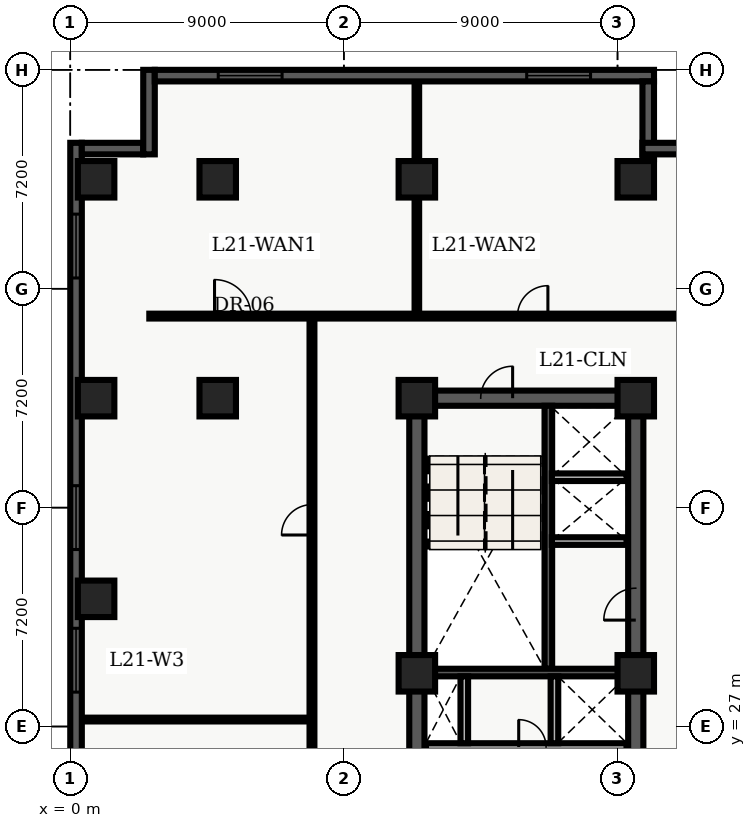
"""IFC4 building model, lengths in metres.
Left out: names, types, materials, properties, quantities, classifications, styles, units other than length and angle.
Written with IfcOpenShell. Run it as: python <this file> out.ifc"""

import sys

from ifc_helpers import new_model, entity, si_unit, converted_unit, direction, frame, origin_with_axes, origin_2d_with_axis, place, context, subcontext, project, spatial, polyline, rectangle, outline, extrude, element, fill, save


model = new_model("IFC4")
c1 = context("Model", 3, precision=1e-05, world=origin_with_axes(), true_north=direction((0.0, 1.0)))
c2 = subcontext(c1, "Body", "Model", "MODEL_VIEW")
j1 = project(units=[si_unit("LENGTHUNIT", "METRE"), converted_unit("PLANEANGLEUNIT", "DEGREE", entity("IfcPlaneAngleMeasure", 0.017), si_unit("PLANEANGLEUNIT", "RADIAN"), dimensions=[0, 0, 0, 0, 0, 0, 0])], contexts=[c1])
p1 = place(None, origin_with_axes())
s1 = spatial("IfcSite", under=j1, at=p1, CompositionType="ELEMENT")
p2 = place(p1, origin_with_axes())
s2 = spatial("IfcBuilding", under=s1, at=p2, CompositionType="ELEMENT")
p3 = place(p2, frame((0.0, 0.0, 89.1), z_axis=(0.0, 0.0, 1.0), x_axis=(1.0, 0.0, 0.0)))
s3 = spatial("IfcBuildingStorey", under=s2, at=p3, CompositionType="ELEMENT", Elevation=89.1)
p4 = place(p3, frame((11.4, 10.8, 0.0), z_axis=(0.0, 0.0, 1.0), x_axis=(0.0, 1.0, 0.0)))
e1 = element("IfcWall", 1, at=p4, inside=s3, PredefinedType="SHEAR", context=c2, shape_type="SweptSolid", body=[
    extrude(outline(polyline([(0.0, -0.25), (27.0, -0.25), (27.0, 0.25), (0.0, 0.25), (0.0, -0.25)])), origin_with_axes(), (0.0, 0.0, 1.0), 3.66),
])
p5 = place(p3, frame((11.4, 37.8, 0.0), z_axis=(0.0, 0.0, 1.0), x_axis=(1.0, 0.0, 0.0)))
e2 = element("IfcWall", 2, at=p5, inside=s3, PredefinedType="SHEAR", context=c2, shape_type="SweptSolid", body=[
    extrude(outline(polyline([(0.0, -0.25), (7.2, -0.25), (7.2, 0.25), (0.0, 0.25), (0.0, -0.25)])), origin_with_axes(), (0.0, 0.0, 1.0), 3.66),
])
p6 = place(p5, frame((2.625, 0.0, 0.0), z_axis=(0.0, 0.0, 1.0), x_axis=(1.0, 0.0, 0.0)))
e3 = element("IfcOpeningElement", 3, at=p6, cuts=e2, PredefinedType="OPENING", context=c2, shape_type="SweptSolid", body=[
    extrude(rectangle(XDim=1.05, YDim=0.52, at=origin_2d_with_axis()), origin_with_axes(), (0.0, 0.0, 1.0), 2.15),
])
p7 = place(p3, frame((18.6, 24.3, 0.0), z_axis=(0.0, 0.0, 1.0), x_axis=(0.0, 1.0, 0.0)))
e4 = element("IfcWall", 4, at=p7, inside=s3, PredefinedType="SHEAR", context=c2, shape_type="SweptSolid", body=[
    extrude(outline(polyline([(0.0, -0.25), (13.5, -0.25), (13.5, 0.25), (0.0, 0.25), (0.0, -0.25)])), origin_with_axes(), (0.0, 0.0, 1.0), 3.66),
])
p8 = place(p7, frame((6.725, 0.0, 0.0), z_axis=(0.0, 0.0, 1.0), x_axis=(1.0, 0.0, 0.0)))
e5 = element("IfcOpeningElement", 5, at=p8, cuts=e4, PredefinedType="OPENING", context=c2, shape_type="SweptSolid", body=[
    extrude(rectangle(XDim=1.05, YDim=0.52, at=origin_2d_with_axis()), origin_with_axes(), (0.0, 0.0, 1.0), 2.15),
])
p9 = place(p3, frame((15.725, 28.9, 0.0), z_axis=(0.0, 0.0, 1.0), x_axis=(0.0, 1.0, 0.0)))
e6 = element("IfcWall", 6, at=p9, inside=s3, PredefinedType="SHEAR", context=c2, shape_type="SweptSolid", body=[
    extrude(outline(polyline([(0.0, -0.125), (8.65, -0.125), (8.65, 0.125), (0.0, 0.125), (0.0, -0.125)])), origin_with_axes(), (0.0, 0.0, 1.0), 3.66),
])
p10 = place(p3, frame((11.65, 28.775, 0.0), z_axis=(0.0, 0.0, 1.0), x_axis=(1.0, 0.0, 0.0)))
e7 = element("IfcWall", 7, at=p10, inside=s3, PredefinedType="SHEAR", context=c2, shape_type="SweptSolid", body=[
    extrude(outline(polyline([(0.0, -0.125), (6.7, -0.125), (6.7, 0.125), (0.0, 0.125), (0.0, -0.125)])), origin_with_axes(), (0.0, 0.0, 1.0), 3.66),
])
p11 = place(p3, frame((11.7, 26.325, 0.0), z_axis=(0.0, 0.0, 1.0), x_axis=(1.0, 0.0, 0.0)))
e8 = element("IfcWall", 8, at=p11, inside=s3, PredefinedType="SOLIDWALL", context=c2, shape_type="SweptSolid", body=[
    extrude(outline(polyline([(0.0, -0.125), (6.6, -0.125), (6.6, 0.125), (0.0, 0.125), (0.0, -0.125)])), origin_with_axes(), (0.0, 0.0, 1.0), 2.7),
])
p12 = place(p11, frame((3.5, 0.0, 0.0), z_axis=(0.0, 0.0, 1.0), x_axis=(1.0, 0.0, 0.0)))
e9 = element("IfcOpeningElement", 9, at=p12, cuts=e8, PredefinedType="OPENING", context=c2, shape_type="SweptSolid", body=[
    extrude(rectangle(XDim=0.9, YDim=0.27, at=origin_2d_with_axis()), origin_with_axes(), (0.0, 0.0, 1.0), 2.15),
])
for number, where, z_axis, x_axis in (
    (10, (12.96, 26.45, 0.0), (0.0, 0.0, 1.0), (0.0, 1.0, 0.0)),
    (11, (15.925, 26.45, 0.0), (0.0, 0.0, 1.0), (0.0, 1.0, 0.0)),
):
    element("IfcWall", number, at=place(p3, frame(where, z_axis=z_axis, x_axis=x_axis)), inside=s3, PredefinedType="SOLIDWALL", context=c2, shape_type="SweptSolid", body=[
        extrude(outline(polyline([(0.0, -0.125), (2.2, -0.125), (2.2, 0.125), (0.0, 0.125), (0.0, -0.125)])), origin_with_axes(), (0.0, 0.0, 1.0), 2.7),
    ])
for number, where, z_axis, x_axis in (
    (12, (11.4, 28.75, 0.0), (0.0, 0.0, 1.0), (1.0, 0.0, 0.0)),
    (13, (11.4, 37.8, 0.0), (0.0, 0.0, 1.0), (1.0, 0.0, 0.0)),
    (14, (11.4, 45.0, 0.0), (0.0, 0.0, 1.0), (1.0, 0.0, 0.0)),
    (15, (18.6, 28.75, 0.0), (0.0, 0.0, 1.0), (1.0, 0.0, 0.0)),
    (16, (18.6, 37.8, 0.0), (0.0, 0.0, 1.0), (1.0, 0.0, 0.0)),
    (17, (18.6, 45.0, 0.0), (0.0, 0.0, 1.0), (1.0, 0.0, 0.0)),
    (18, (4.85, 37.8, 0.0), (0.0, 0.0, 1.0), (1.0, 0.0, 0.0)),
    (19, (4.85, 45.0, 0.0), (0.0, 0.0, 1.0), (1.0, 0.0, 0.0)),
    (20, (0.85, 31.2, 0.0), (0.0, 0.0, 1.0), (1.0, 0.0, 0.0)),
    (21, (0.85, 37.8, 0.0), (0.0, 0.0, 1.0), (1.0, 0.0, 0.0)),
    (22, (0.85, 45.0, 0.0), (0.0, 0.0, 1.0), (1.0, 0.0, 0.0)),
):
    element("IfcColumn", number, at=place(p3, frame(where, z_axis=z_axis, x_axis=x_axis)), inside=s3, PredefinedType="COLUMN", context=c2, shape_type="SweptSolid", body=[
        extrude(rectangle(XDim=1.2, YDim=1.2, at=origin_2d_with_axis()), origin_with_axes(), (0.0, 0.0, 1.0), 3.9),
    ])
for number, where, z_axis, x_axis in (
    (23, (15.84, 33.1, 0.0), (0.0, 0.0, 1.0), (1.0, 0.0, 0.0)),
    (24, (15.84, 35.2, 0.0), (0.0, 0.0, 1.0), (1.0, 0.0, 0.0)),
):
    element("IfcWall", number, at=place(p3, frame(where, z_axis=z_axis, x_axis=x_axis)), inside=s3, PredefinedType="SOLIDWALL", context=c2, shape_type="SweptSolid", body=[
        extrude(outline(polyline([(0.0, -0.125), (2.46, -0.125), (2.46, 0.125), (0.0, 0.125), (0.0, -0.125)])), origin_with_axes(), (0.0, 0.0, 1.0), 2.7),
    ])
p13 = place(p3, frame((2.6, 40.5, 0.0), z_axis=(0.0, 0.0, 1.0), x_axis=(1.0, 0.0, 0.0)))
e25 = element("IfcWall", 25, at=p13, inside=s3, PredefinedType="PARTITIONING", context=c2, shape_type="SweptSolid", body=[
    extrude(outline(polyline([(0.0, -0.08), (18.65, -0.08), (18.65, 0.08), (0.0, 0.08), (0.0, -0.08)])), origin_with_axes(), (0.0, 0.0, 1.0), 2.7),
])
p14 = place(p13, frame((2.745, 0.0, 0.0), z_axis=(0.0, 0.0, 1.0), x_axis=(1.0, 0.0, 0.0)))
e26 = element("IfcOpeningElement", 26, at=p14, cuts=e25, PredefinedType="OPENING", context=c2, shape_type="SweptSolid", body=[
    extrude(rectangle(XDim=1.2, YDim=0.18, at=origin_2d_with_axis()), origin_with_axes(), (0.0, 0.0, 1.0), 2.2),
])
p15 = place(p13, frame((12.61, 0.0, 0.0), z_axis=(0.0, 0.0, 1.0), x_axis=(1.0, 0.0, 0.0)))
e27 = element("IfcOpeningElement", 27, at=p15, cuts=e25, PredefinedType="OPENING", context=c2, shape_type="SweptSolid", body=[
    extrude(rectangle(XDim=1.0, YDim=0.18, at=origin_2d_with_axis()), origin_with_axes(), (0.0, 0.0, 1.0), 2.15),
])
p16 = place(p3, frame((7.95, 7.8, 0.0), z_axis=(0.0, 0.0, 1.0), x_axis=(0.0, 1.0, 0.0)))
e28 = element("IfcWall", 28, at=p16, inside=s3, PredefinedType="PARTITIONING", context=c2, shape_type="SweptSolid", body=[
    extrude(outline(polyline([(0.0, -0.08), (32.7, -0.08), (32.7, 0.08), (0.0, 0.08), (0.0, -0.08)])), origin_with_axes(), (0.0, 0.0, 1.0), 2.7),
])
p17 = place(p16, frame((4.411, 0.0, 0.0), z_axis=(0.0, 0.0, 1.0), x_axis=(1.0, 0.0, 0.0)))
e29 = element("IfcOpeningElement", 29, at=p17, cuts=e28, PredefinedType="OPENING", context=c2, shape_type="SweptSolid", body=[
    extrude(rectangle(XDim=1.0, YDim=0.18, at=origin_2d_with_axis()), origin_with_axes(), (0.0, 0.0, 1.0), 2.15),
])
p18 = place(p16, frame((14.06, 0.0, 0.0), z_axis=(0.0, 0.0, 1.0), x_axis=(1.0, 0.0, 0.0)))
e30 = element("IfcOpeningElement", 30, at=p18, cuts=e28, PredefinedType="OPENING", context=c2, shape_type="SweptSolid", body=[
    extrude(rectangle(XDim=1.0, YDim=0.18, at=origin_2d_with_axis()), origin_with_axes(), (0.0, 0.0, 1.0), 2.15),
])
p19 = place(p16, frame((26.0, 0.0, 0.0), z_axis=(0.0, 0.0, 1.0), x_axis=(1.0, 0.0, 0.0)))
e31 = element("IfcOpeningElement", 31, at=p19, cuts=e28, PredefinedType="OPENING", context=c2, shape_type="SweptSolid", body=[
    extrude(rectangle(XDim=1.0, YDim=0.18, at=origin_2d_with_axis()), origin_with_axes(), (0.0, 0.0, 1.0), 2.15),
])
p20 = place(p3, frame((0.375, 27.229, 0.0), z_axis=(0.0, 0.0, 1.0), x_axis=(1.0, 0.0, 0.0)))
e32 = element("IfcWall", 32, at=p20, inside=s3, PredefinedType="PARTITIONING", context=c2, shape_type="SweptSolid", body=[
    extrude(outline(polyline([(0.0, -0.062), (7.455, -0.062), (7.455, 0.062), (0.0, 0.062), (0.0, -0.062)])), origin_with_axes(), (0.0, 0.0, 1.0), 2.7),
])
p21 = place(p3, frame((11.4, 40.6, 0.0), z_axis=(0.0, 0.0, 1.0), x_axis=(0.0, 1.0, 0.0)))
e33 = element("IfcWall", 33, at=p21, inside=s3, PredefinedType="PARTITIONING", context=c2, shape_type="SweptSolid", body=[
    extrude(outline(polyline([(0.0, -0.075), (7.64, -0.075), (7.64, 0.075), (0.0, 0.075), (0.0, -0.075)])), origin_with_axes(), (0.0, 0.0, 1.0), 2.7),
])
p22 = place(p3, frame((0.19, 2.78, 0.0), z_axis=(0.0, 0.0, 1.0), x_axis=(0.0, 1.0, 0.0)))
e34 = element("IfcWall", 34, at=p22, inside=s3, PredefinedType="SOLIDWALL", context=c2, shape_type="SweptSolid", body=[
    extrude(outline(polyline([(0.0, -0.19), (43.42, -0.19), (43.42, 0.19), (0.0, 0.19), (0.0, -0.19)])), origin_with_axes(), (0.0, 0.0, 1.0), 3.66),
])
p23 = place(p22, frame((2.946, 0.0, 0.45), z_axis=(0.0, 0.0, 1.0), x_axis=(1.0, 0.0, 0.0)))
e35 = element("IfcOpeningElement", 35, at=p23, cuts=e34, PredefinedType="OPENING", context=c2, shape_type="SweptSolid", body=[
    extrude(rectangle(XDim=2.1, YDim=0.4, at=origin_2d_with_axis()), origin_with_axes(), (0.0, 0.0, 1.0), 2.2),
])
p24 = place(p22, frame((11.878, 0.0, 0.45), z_axis=(0.0, 0.0, 1.0), x_axis=(1.0, 0.0, 0.0)))
e36 = element("IfcOpeningElement", 36, at=p24, cuts=e34, PredefinedType="OPENING", context=c2, shape_type="SweptSolid", body=[
    extrude(rectangle(XDim=2.1, YDim=0.4, at=origin_2d_with_axis()), origin_with_axes(), (0.0, 0.0, 1.0), 2.2),
])
p25 = place(p22, frame((17.469, 0.0, 0.45), z_axis=(0.0, 0.0, 1.0), x_axis=(1.0, 0.0, 0.0)))
e37 = element("IfcOpeningElement", 37, at=p25, cuts=e34, PredefinedType="OPENING", context=c2, shape_type="SweptSolid", body=[
    extrude(rectangle(XDim=2.1, YDim=0.4, at=origin_2d_with_axis()), origin_with_axes(), (0.0, 0.0, 1.0), 2.2),
])
p26 = place(p22, frame((21.71, 0.0, 0.45), z_axis=(0.0, 0.0, 1.0), x_axis=(1.0, 0.0, 0.0)))
e38 = element("IfcOpeningElement", 38, at=p26, cuts=e34, PredefinedType="OPENING", context=c2, shape_type="SweptSolid", body=[
    extrude(rectangle(XDim=2.1, YDim=0.4, at=origin_2d_with_axis()), origin_with_axes(), (0.0, 0.0, 1.0), 2.2),
])
p27 = place(p22, frame((26.401, 0.0, 0.45), z_axis=(0.0, 0.0, 1.0), x_axis=(1.0, 0.0, 0.0)))
e39 = element("IfcOpeningElement", 39, at=p27, cuts=e34, PredefinedType="OPENING", context=c2, shape_type="SweptSolid", body=[
    extrude(rectangle(XDim=2.1, YDim=0.4, at=origin_2d_with_axis()), origin_with_axes(), (0.0, 0.0, 1.0), 2.2),
])
p28 = place(p22, frame((31.092, 0.0, 0.45), z_axis=(0.0, 0.0, 1.0), x_axis=(1.0, 0.0, 0.0)))
e40 = element("IfcOpeningElement", 40, at=p28, cuts=e34, PredefinedType="OPENING", context=c2, shape_type="SweptSolid", body=[
    extrude(rectangle(XDim=2.1, YDim=0.4, at=origin_2d_with_axis()), origin_with_axes(), (0.0, 0.0, 1.0), 2.2),
])
p29 = place(p22, frame((40.024, 0.0, 0.45), z_axis=(0.0, 0.0, 1.0), x_axis=(1.0, 0.0, 0.0)))
e41 = element("IfcOpeningElement", 41, at=p29, cuts=e34, PredefinedType="OPENING", context=c2, shape_type="SweptSolid", body=[
    extrude(rectangle(XDim=2.1, YDim=0.4, at=origin_2d_with_axis()), origin_with_axes(), (0.0, 0.0, 1.0), 2.2),
])
p30 = place(p3, frame((0.38, 46.01, 0.0), z_axis=(0.0, 0.0, 1.0), x_axis=(1.0, 0.0, 0.0)))
e42 = element("IfcWall", 42, at=p30, inside=s3, PredefinedType="SOLIDWALL", context=c2, shape_type="SweptSolid", body=[
    extrude(outline(polyline([(0.0, -0.19), (2.02, -0.19), (2.02, 0.19), (0.0, 0.19), (0.0, -0.19)])), origin_with_axes(), (0.0, 0.0, 1.0), 3.66),
])
p31 = place(p3, frame((2.59, 45.82, 0.0), z_axis=(0.0, 0.0, 1.0), x_axis=(0.0, 1.0, 0.0)))
e43 = element("IfcWall", 43, at=p31, inside=s3, PredefinedType="SOLIDWALL", context=c2, shape_type="SweptSolid", body=[
    extrude(outline(polyline([(0.0, -0.19), (2.78, -0.19), (2.78, 0.19), (0.0, 0.19), (0.0, -0.19)])), origin_with_axes(), (0.0, 0.0, 1.0), 3.66),
])
p32 = place(p3, frame((2.78, 48.41, 0.0), z_axis=(0.0, 0.0, 1.0), x_axis=(1.0, 0.0, 0.0)))
e44 = element("IfcWall", 44, at=p32, inside=s3, PredefinedType="SOLIDWALL", context=c2, shape_type="SweptSolid", body=[
    extrude(outline(polyline([(0.0, -0.19), (16.42, -0.19), (16.42, 0.19), (0.0, 0.19), (0.0, -0.19)])), origin_with_axes(), (0.0, 0.0, 1.0), 3.66),
])
p33 = place(p32, frame((3.137, 0.0, 0.45), z_axis=(0.0, 0.0, 1.0), x_axis=(1.0, 0.0, 0.0)))
e45 = element("IfcOpeningElement", 45, at=p33, cuts=e44, PredefinedType="OPENING", context=c2, shape_type="SweptSolid", body=[
    extrude(rectangle(XDim=2.1, YDim=0.4, at=origin_2d_with_axis()), origin_with_axes(), (0.0, 0.0, 1.0), 2.2),
])
p34 = place(p32, frame((13.283, 0.0, 0.45), z_axis=(0.0, 0.0, 1.0), x_axis=(1.0, 0.0, 0.0)))
e46 = element("IfcOpeningElement", 46, at=p34, cuts=e44, PredefinedType="OPENING", context=c2, shape_type="SweptSolid", body=[
    extrude(rectangle(XDim=2.1, YDim=0.4, at=origin_2d_with_axis()), origin_with_axes(), (0.0, 0.0, 1.0), 2.2),
])
p35 = place(p3, frame((19.01, 48.22, 0.0), z_axis=(0.0, 0.0, 1.0), x_axis=(0.0, -1.0, 0.0)))
e47 = element("IfcWall", 47, at=p35, inside=s3, PredefinedType="SOLIDWALL", context=c2, shape_type="SweptSolid", body=[
    extrude(outline(polyline([(0.0, -0.19), (2.56, -0.19), (2.56, 0.19), (0.0, 0.19), (0.0, -0.19)])), origin_with_axes(), (0.0, 0.0, 1.0), 3.66),
])
p36 = place(p3, frame((18.82, 46.01, 0.0), z_axis=(0.0, 0.0, 1.0), x_axis=(1.0, 0.0, 0.0)))
e48 = element("IfcWall", 48, at=p36, inside=s3, PredefinedType="SOLIDWALL", context=c2, shape_type="SweptSolid", body=[
    extrude(outline(polyline([(0.0, -0.19), (2.78, -0.19), (2.78, 0.19), (0.0, 0.19), (0.0, -0.19)])), origin_with_axes(), (0.0, 0.0, 1.0), 3.66),
])
p37 = place(p5, frame((2.625, 0.0, 0.0), z_axis=(0.0, 0.0, 1.0), x_axis=(1.0, 0.0, 0.0)))
e49 = element("IfcDoor", 49, at=p37, inside=s3, OperationType="SINGLE_SWING_RIGHT", PredefinedType="DOOR", context=c2, shape_type="SweptSolid", body=[
    extrude(rectangle(XDim=1.05, YDim=0.09, at=origin_2d_with_axis()), origin_with_axes(), (0.0, 0.0, 1.0), 2.15),
])
fill(e3, e49)
p38 = place(p11, frame((3.5, 0.0, 0.0), z_axis=(0.0, 0.0, 1.0), x_axis=(1.0, 0.0, 0.0)))
e50 = element("IfcDoor", 50, at=p38, inside=s3, OperationType="SINGLE_SWING_LEFT", PredefinedType="DOOR", context=c2, shape_type="SweptSolid", body=[
    extrude(rectangle(XDim=0.9, YDim=0.09, at=origin_2d_with_axis()), origin_with_axes(), (0.0, 0.0, 1.0), 2.15),
])
fill(e9, e50)
p39 = place(p7, frame((6.725, 0.0, 0.0), z_axis=(0.0, 0.0, 1.0), x_axis=(1.0, 0.0, 0.0)))
e51 = element("IfcDoor", 51, at=p39, inside=s3, OperationType="SINGLE_SWING_LEFT", PredefinedType="DOOR", context=c2, shape_type="SweptSolid", body=[
    extrude(rectangle(XDim=1.05, YDim=0.09, at=origin_2d_with_axis()), origin_with_axes(), (0.0, 0.0, 1.0), 2.15),
])
fill(e5, e51)
p40 = place(p16, frame((26.0, 0.0, 0.0), z_axis=(0.0, 0.0, 1.0), x_axis=(1.0, 0.0, 0.0)))
e52 = element("IfcDoor", 52, at=p40, inside=s3, OperationType="SINGLE_SWING_LEFT", PredefinedType="DOOR", context=c2, shape_type="SweptSolid", body=[
    extrude(rectangle(XDim=1.0, YDim=0.09, at=origin_2d_with_axis()), origin_with_axes(), (0.0, 0.0, 1.0), 2.15),
])
fill(e31, e52)
p41 = place(p13, frame((2.745, 0.0, 0.0), z_axis=(0.0, 0.0, 1.0), x_axis=(1.0, 0.0, 0.0)))
e53 = element("IfcDoor", 53, at=p41, inside=s3, OperationType="SINGLE_SWING_LEFT", PredefinedType="DOOR", context=c2, shape_type="SweptSolid", body=[
    extrude(rectangle(XDim=1.2, YDim=0.09, at=origin_2d_with_axis()), origin_with_axes(), (0.0, 0.0, 1.0), 2.2),
])
fill(e26, e53)
p42 = place(p13, frame((12.61, 0.0, 0.0), z_axis=(0.0, 0.0, 1.0), x_axis=(1.0, 0.0, 0.0)))
e54 = element("IfcDoor", 54, at=p42, inside=s3, OperationType="SINGLE_SWING_RIGHT", PredefinedType="DOOR", context=c2, shape_type="SweptSolid", body=[
    extrude(rectangle(XDim=1.0, YDim=0.09, at=origin_2d_with_axis()), origin_with_axes(), (0.0, 0.0, 1.0), 2.15),
])
fill(e27, e54)
p43 = place(p22, frame((26.401, 0.0, 0.45), z_axis=(0.0, 0.0, 1.0), x_axis=(1.0, 0.0, 0.0)))
e55 = element("IfcWindow", 55, at=p43, inside=s3, PredefinedType="WINDOW", context=c2, shape_type="SweptSolid", body=[
    extrude(rectangle(XDim=2.1, YDim=0.09, at=origin_2d_with_axis()), origin_with_axes(), (0.0, 0.0, 1.0), 2.2),
])
fill(e39, e55)
p44 = place(p22, frame((31.092, 0.0, 0.45), z_axis=(0.0, 0.0, 1.0), x_axis=(1.0, 0.0, 0.0)))
e56 = element("IfcWindow", 56, at=p44, inside=s3, PredefinedType="WINDOW", context=c2, shape_type="SweptSolid", body=[
    extrude(rectangle(XDim=2.1, YDim=0.09, at=origin_2d_with_axis()), origin_with_axes(), (0.0, 0.0, 1.0), 2.2),
])
fill(e40, e56)
p45 = place(p22, frame((40.024, 0.0, 0.45), z_axis=(0.0, 0.0, 1.0), x_axis=(1.0, 0.0, 0.0)))
e57 = element("IfcWindow", 57, at=p45, inside=s3, PredefinedType="WINDOW", context=c2, shape_type="SweptSolid", body=[
    extrude(rectangle(XDim=2.1, YDim=0.09, at=origin_2d_with_axis()), origin_with_axes(), (0.0, 0.0, 1.0), 2.2),
])
fill(e41, e57)
p46 = place(p32, frame((3.137, 0.0, 0.45), z_axis=(0.0, 0.0, 1.0), x_axis=(1.0, 0.0, 0.0)))
e58 = element("IfcWindow", 58, at=p46, inside=s3, PredefinedType="WINDOW", context=c2, shape_type="SweptSolid", body=[
    extrude(rectangle(XDim=2.1, YDim=0.09, at=origin_2d_with_axis()), origin_with_axes(), (0.0, 0.0, 1.0), 2.2),
])
fill(e45, e58)
p47 = place(p32, frame((13.283, 0.0, 0.45), z_axis=(0.0, 0.0, 1.0), x_axis=(1.0, 0.0, 0.0)))
e59 = element("IfcWindow", 59, at=p47, inside=s3, PredefinedType="WINDOW", context=c2, shape_type="SweptSolid", body=[
    extrude(rectangle(XDim=2.1, YDim=0.09, at=origin_2d_with_axis()), origin_with_axes(), (0.0, 0.0, 1.0), 2.2),
])
fill(e46, e59)
save(model, sys.argv[1])
